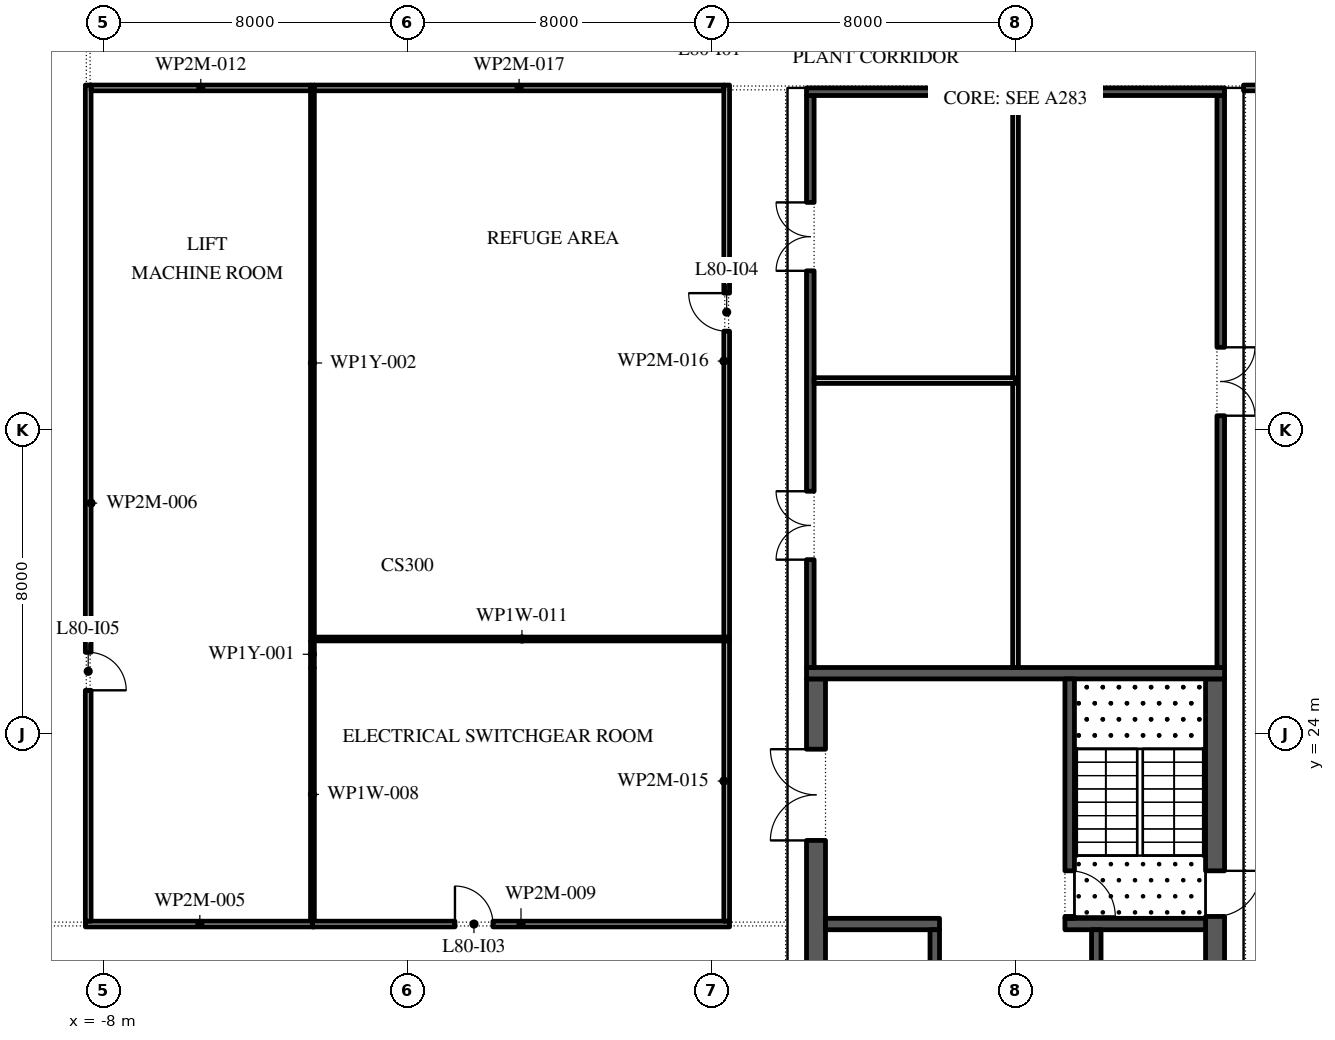
"""IFC4 building model, lengths in metres.
Left out: names, types, materials, properties, quantities, classifications, styles, units other than length and angle.
Written with IfcOpenShell. Run it as: python <this file> out.ifc"""

import sys

from ifc_helpers import new_model, si_unit, direction, frame, frame_2d, origin, place, context, subcontext, project, spatial, rectangle, extrude, element, fill, save


model = new_model("IFC4")
c1 = context("Model", 3, precision=1e-05, world=origin(), true_north=direction((0.0, 1.0)))
c2 = subcontext(c1, "Body", "Model", "MODEL_VIEW")
j1 = project(units=[si_unit("LENGTHUNIT", "METRE"), si_unit("PLANEANGLEUNIT", "RADIAN")], contexts=[c1])
p1 = place(None, origin())
s1 = spatial("IfcSite", under=j1, at=p1, CompositionType="ELEMENT")
p2 = place(p1, origin())
s2 = spatial("IfcBuilding", under=s1, at=p2, CompositionType="ELEMENT")
p3 = place(p2, frame((0.0, 0.0, 363.6)))
s3 = spatial("IfcBuildingStorey", under=s2, at=p3, CompositionType="ELEMENT", Elevation=363.6)
p4 = place(p3, frame((21.25, -2.45, 0.0), z_axis=(0.0, 0.0, 1.0), x_axis=(0.0, 1.0, 0.0)))
e1 = element("IfcWall", 1, at=p4, inside=s3, PredefinedType="SHEAR", context=c2, shape_type="SweptSolid", body=[
    extrude(rectangle(XDim=27.9, YDim=0.5, at=frame_2d((13.95, 0.0))), origin(), (0.0, 0.0, 1.0), 5.2),
])
p5 = place(p4, frame((5.05, 0.0, 0.0)))
e2 = element("IfcOpeningElement", 2, at=p5, cuts=e1, PredefinedType="OPENING", context=c2, shape_type="SweptSolid", body=[
    extrude(rectangle(XDim=1.2, YDim=2.1, at=frame_2d((0.6, 1.05))), frame((0.0, 0.26, 0.0), z_axis=(0.0, -1.0, 0.0), x_axis=(1.0, 0.0, 0.0)), (0.0, 0.0, 1.0), 0.52),
])
p6 = place(p4, frame((21.65, 0.0, 0.0)))
e3 = element("IfcOpeningElement", 3, at=p6, cuts=e1, PredefinedType="OPENING", context=c2, shape_type="SweptSolid", body=[
    extrude(rectangle(XDim=1.2, YDim=2.1, at=frame_2d((0.6, 1.05))), frame((0.0, 0.26, 0.0), z_axis=(0.0, -1.0, 0.0), x_axis=(1.0, 0.0, 0.0)), (0.0, 0.0, 1.0), 0.52),
])
p7 = place(p3, frame((10.75, -2.45, 0.0), z_axis=(0.0, 0.0, 1.0), x_axis=(0.0, 1.0, 0.0)))
e4 = element("IfcWall", 4, at=p7, inside=s3, PredefinedType="SHEAR", context=c2, shape_type="SweptSolid", body=[
    extrude(rectangle(XDim=27.9, YDim=0.5, at=frame_2d((13.95, 0.0))), origin(), (0.0, 0.0, 1.0), 5.2),
])
p8 = place(p7, frame((23.65, 0.0, 0.0)))
e5 = element("IfcOpeningElement", 5, at=p8, cuts=e4, PredefinedType="OPENING", context=c2, shape_type="SweptSolid", body=[
    extrude(rectangle(XDim=2.4, YDim=2.1, at=frame_2d((1.2, 1.05))), frame((0.0, 0.26, 0.0), z_axis=(0.0, -1.0, 0.0), x_axis=(1.0, 0.0, 0.0)), (0.0, 0.0, 1.0), 0.52),
])
p9 = place(p7, frame((2.25, 0.0, 0.0)))
e6 = element("IfcOpeningElement", 6, at=p9, cuts=e4, PredefinedType="OPENING", context=c2, shape_type="SweptSolid", body=[
    extrude(rectangle(XDim=1.8, YDim=2.4, at=frame_2d((0.9, 1.2))), frame((0.0, 0.26, 0.0), z_axis=(0.0, -1.0, 0.0), x_axis=(1.0, 0.0, 0.0)), (0.0, 0.0, 1.0), 0.52),
])
p10 = place(p3, frame((10.5, 25.6, 0.0), z_axis=(0.0, 0.0, 1.0), x_axis=(1.0, 0.0, 0.0)))
e7 = element("IfcWall", 7, at=p10, inside=s3, PredefinedType="SHEAR", context=c2, shape_type="SweptSolid", body=[
    extrude(rectangle(XDim=11.0, YDim=0.3, at=frame_2d((5.5, 0.0))), origin(), (0.0, 0.0, 1.0), 5.2),
])
p11 = place(p3, frame((17.3, 19.0, 0.0), z_axis=(0.0, 0.0, 1.0), x_axis=(1.0, 0.0, 0.0)))
e8 = element("IfcWall", 8, at=p11, inside=s3, PredefinedType="SHEAR", context=c2, shape_type="SweptSolid", body=[
    extrude(rectangle(XDim=3.7, YDim=0.3, at=frame_2d((1.85, 0.0))), origin(), (0.0, 0.0, 1.0), 5.2),
])
p12 = place(p3, frame((17.425, 19.15, 0.0), z_axis=(0.0, 0.0, 1.0), x_axis=(0.0, 1.0, 0.0)))
e9 = element("IfcWall", 9, at=p12, inside=s3, PredefinedType="SHEAR", context=c2, shape_type="SweptSolid", body=[
    extrude(rectangle(XDim=6.3, YDim=0.25, at=frame_2d((3.15, 0.0))), origin(), (0.0, 0.0, 1.0), 5.2),
])
p13 = place(p12, frame((0.05, 0.0, 0.0)))
e10 = element("IfcOpeningElement", 10, at=p13, cuts=e9, PredefinedType="OPENING", context=c2, shape_type="SweptSolid", body=[
    extrude(rectangle(XDim=1.2, YDim=2.1, at=frame_2d((0.6, 1.05))), frame((0.0, 0.135, 0.0), z_axis=(0.0, -1.0, 0.0), x_axis=(1.0, 0.0, 0.0)), (0.0, 0.0, 1.0), 0.27),
])
p14 = place(p3, frame((18.125, 4.15, 0.0), z_axis=(0.0, 0.0, 1.0), x_axis=(0.0, 1.0, 0.0)))
e11 = element("IfcWall", 11, at=p14, inside=s3, PredefinedType="SHEAR", context=c2, shape_type="SweptSolid", body=[
    extrude(rectangle(XDim=14.7, YDim=0.25, at=frame_2d((7.35, 0.0))), origin(), (0.0, 0.0, 1.0), 5.2),
])
p15 = place(p14, frame((7.521, 0.0, 0.0)))
e12 = element("IfcOpeningElement", 12, at=p15, cuts=e11, PredefinedType="OPENING", context=c2, shape_type="SweptSolid", body=[
    extrude(rectangle(XDim=1.8, YDim=2.4, at=frame_2d((0.9, 1.2))), frame((0.0, 0.135, 0.0), z_axis=(0.0, -1.0, 0.0), x_axis=(1.0, 0.0, 0.0)), (0.0, 0.0, 1.0), 0.27),
])
p16 = place(p14, frame((0.371, 0.0, 0.0)))
e13 = element("IfcOpeningElement", 13, at=p16, cuts=e11, PredefinedType="OPENING", context=c2, shape_type="SweptSolid", body=[
    extrude(rectangle(XDim=1.1, YDim=2.1, at=frame_2d((0.55, 1.05))), frame((0.0, 0.135, 0.0), z_axis=(0.0, -1.0, 0.0), x_axis=(1.0, 0.0, 0.0)), (0.0, 0.0, 1.0), 0.27),
])
p17 = place(p3, frame((11.0, 19.0, 0.0), z_axis=(0.0, 0.0, 1.0), x_axis=(1.0, 0.0, 0.0)))
e14 = element("IfcWall", 14, at=p17, inside=s3, PredefinedType="SHEAR", context=c2, shape_type="SweptSolid", body=[
    extrude(rectangle(XDim=3.0, YDim=0.3, at=frame_2d((1.5, 0.0))), origin(), (0.0, 0.0, 1.0), 5.2),
])
p18 = place(p3, frame((13.875, -2.45, 0.0), z_axis=(0.0, 0.0, 1.0), x_axis=(0.0, 1.0, 0.0)))
e15 = element("IfcWall", 15, at=p18, inside=s3, PredefinedType="SHEAR", context=c2, shape_type="SweptSolid", body=[
    extrude(rectangle(XDim=21.3, YDim=0.25, at=frame_2d((10.65, 0.0))), origin(), (0.0, 0.0, 1.0), 5.2),
])
p19 = place(p18, frame((10.907, 0.0, 0.0)))
e16 = element("IfcOpeningElement", 16, at=p19, cuts=e15, PredefinedType="OPENING", context=c2, shape_type="SweptSolid", body=[
    extrude(rectangle(XDim=1.8, YDim=2.4, at=frame_2d((0.9, 1.2))), frame((0.0, 0.135, 0.0), z_axis=(0.0, -1.0, 0.0), x_axis=(1.0, 0.0, 0.0)), (0.0, 0.0, 1.0), 0.27),
])
p20 = place(p18, frame((6.971, 0.0, 0.0)))
e17 = element("IfcOpeningElement", 17, at=p20, cuts=e15, PredefinedType="OPENING", context=c2, shape_type="SweptSolid", body=[
    extrude(rectangle(XDim=1.1, YDim=2.1, at=frame_2d((0.55, 1.05))), frame((0.0, 0.135, 0.0), z_axis=(0.0, -1.0, 0.0), x_axis=(1.0, 0.0, 0.0)), (0.0, 0.0, 1.0), 0.27),
])
p21 = place(p3, frame((21.4, 25.75, 0.0), z_axis=(0.0, 0.0, 1.0), x_axis=(0.0, 1.0, 0.0)))
e18 = element("IfcWall", 18, at=p21, inside=s3, PredefinedType="SHEAR", context=c2, shape_type="SweptSolid", body=[
    extrude(rectangle(XDim=15.05, YDim=0.2, at=frame_2d((7.525, 0.0))), origin(), (0.0, 0.0, 1.0), 5.2),
])
p22 = place(p21, frame((6.625, 0.0, 0.0)))
e19 = element("IfcOpeningElement", 19, at=p22, cuts=e18, PredefinedType="OPENING", context=c2, shape_type="SweptSolid", body=[
    extrude(rectangle(XDim=1.8, YDim=2.4, at=frame_2d((0.9, 1.2))), frame((0.0, 0.11, 0.0), z_axis=(0.0, -1.0, 0.0), x_axis=(1.0, 0.0, 0.0)), (0.0, 0.0, 1.0), 0.22),
])
p23 = place(p3, frame((10.6, 25.75, 0.0), z_axis=(0.0, 0.0, 1.0), x_axis=(0.0, 1.0, 0.0)))
e20 = element("IfcWall", 20, at=p23, inside=s3, PredefinedType="SHEAR", context=c2, shape_type="SweptSolid", body=[
    extrude(rectangle(XDim=15.05, YDim=0.2, at=frame_2d((7.525, 0.0))), origin(), (0.0, 0.0, 1.0), 5.2),
])
p24 = place(p23, frame((2.837, 0.0, 0.0)))
e21 = element("IfcOpeningElement", 21, at=p24, cuts=e20, PredefinedType="OPENING", context=c2, shape_type="SweptSolid", body=[
    extrude(rectangle(XDim=1.8, YDim=2.4, at=frame_2d((0.9, 1.2))), frame((0.0, 0.11, 0.0), z_axis=(0.0, -1.0, 0.0), x_axis=(1.0, 0.0, 0.0)), (0.0, 0.0, 1.0), 0.22),
])
p25 = place(p23, frame((10.438, 0.0, 0.0)))
e22 = element("IfcOpeningElement", 22, at=p25, cuts=e20, PredefinedType="OPENING", context=c2, shape_type="SweptSolid", body=[
    extrude(rectangle(XDim=1.8, YDim=2.4, at=frame_2d((0.9, 1.2))), frame((0.0, 0.11, 0.0), z_axis=(0.0, -1.0, 0.0), x_axis=(1.0, 0.0, 0.0)), (0.0, 0.0, 1.0), 0.22),
])
p26 = place(p3, frame((10.5, 40.9, 0.0), z_axis=(0.0, 0.0, 1.0), x_axis=(1.0, 0.0, 0.0)))
e23 = element("IfcWall", 23, at=p26, inside=s3, PredefinedType="SHEAR", context=c2, shape_type="SweptSolid", body=[
    extrude(rectangle(XDim=11.0, YDim=0.2, at=frame_2d((5.5, 0.0))), origin(), (0.0, 0.0, 1.0), 5.2),
])
p27 = place(p3, frame((16.0, 25.75, 0.0), z_axis=(0.0, 0.0, 1.0), x_axis=(0.0, 1.0, 0.0)))
e24 = element("IfcWall", 24, at=p27, inside=s3, PredefinedType="PARTITIONING", context=c2, shape_type="SweptSolid", body=[
    extrude(rectangle(XDim=15.05, YDim=0.15, at=frame_2d((7.525, 0.0))), origin(), (0.0, 0.0, 1.0), 5.2),
])
p28 = place(p3, frame((10.7, 33.3, 0.0), z_axis=(0.0, 0.0, 1.0), x_axis=(1.0, 0.0, 0.0)))
e25 = element("IfcWall", 25, at=p28, inside=s3, PredefinedType="PARTITIONING", context=c2, shape_type="SweptSolid", body=[
    extrude(rectangle(XDim=5.3, YDim=0.15, at=frame_2d((2.65, 0.0))), origin(), (0.0, 0.0, 1.0), 5.2),
])
p29 = place(p3, frame((-8.475, 19.0, 0.0), z_axis=(0.0, 0.0, 1.0), x_axis=(1.0, 0.0, 0.0)))
e26 = element("IfcWall", 26, at=p29, inside=s3, PredefinedType="PARTITIONING", context=c2, shape_type="SweptSolid", body=[
    extrude(rectangle(XDim=6.025, YDim=0.15, at=frame_2d((3.013, 0.0))), origin(), (0.0, 0.0, 1.0), 5.2),
])
p30 = place(p3, frame((-8.4, 41.075, 0.0), z_axis=(0.0, 0.0, 1.0), x_axis=(0.0, -1.0, 0.0)))
e27 = element("IfcWall", 27, at=p30, inside=s3, PredefinedType="PARTITIONING", context=c2, shape_type="SweptSolid", body=[
    extrude(rectangle(XDim=22.0, YDim=0.15, at=frame_2d((11.0, 0.0))), origin(), (0.0, 0.0, 1.0), 5.2),
])
p31 = place(p30, frame((14.925, 0.0, 0.0)))
e28 = element("IfcOpeningElement", 28, at=p31, cuts=e27, PredefinedType="OPENING", context=c2, shape_type="SweptSolid", body=[
    extrude(rectangle(XDim=1.0, YDim=2.1, at=frame_2d((0.5, 1.05))), frame((0.0, 0.085, 0.0), z_axis=(0.0, -1.0, 0.0), x_axis=(1.0, 0.0, 0.0)), (0.0, 0.0, 1.0), 0.17),
])
p32 = place(p3, frame((-2.5, 19.075, 0.0), z_axis=(0.0, 0.0, 1.0), x_axis=(0.0, 1.0, 0.0)))
e29 = element("IfcWall", 29, at=p32, inside=s3, PredefinedType="PARTITIONING", context=c2, shape_type="SweptSolid", body=[
    extrude(rectangle(XDim=6.67, YDim=0.1, at=frame_2d((3.335, 0.0))), origin(), (0.0, 0.0, 1.0), 5.2),
])
p33 = place(p3, frame((-2.5, 19.0, 0.0), z_axis=(0.0, 0.0, 1.0), x_axis=(1.0, 0.0, 0.0)))
e30 = element("IfcWall", 30, at=p33, inside=s3, PredefinedType="PARTITIONING", context=c2, shape_type="SweptSolid", body=[
    extrude(rectangle(XDim=10.975, YDim=0.15, at=frame_2d((5.488, 0.0))), origin(), (0.0, 0.0, 1.0), 5.2),
])
p34 = place(p33, frame((3.75, 0.0, 0.0)))
e31 = element("IfcOpeningElement", 31, at=p34, cuts=e30, PredefinedType="OPENING", context=c2, shape_type="SweptSolid", body=[
    extrude(rectangle(XDim=1.0, YDim=2.1, at=frame_2d((0.5, 1.05))), frame((0.0, 0.085, 0.0), z_axis=(0.0, -1.0, 0.0), x_axis=(1.0, 0.0, 0.0)), (0.0, 0.0, 1.0), 0.17),
])
p35 = place(p3, frame((-2.5, 26.45, 0.0), z_axis=(0.0, 0.0, 1.0), x_axis=(0.0, 1.0, 0.0)))
e32 = element("IfcWall", 32, at=p35, inside=s3, PredefinedType="PARTITIONING", context=c2, shape_type="SweptSolid", body=[
    extrude(rectangle(XDim=14.625, YDim=0.1, at=frame_2d((7.312, 0.0))), origin(), (0.0, 0.0, 1.0), 4.22),
])
p36 = place(p3, frame((-2.45, 26.5, 0.0), z_axis=(0.0, 0.0, 1.0), x_axis=(1.0, 0.0, 0.0)))
e33 = element("IfcWall", 33, at=p36, inside=s3, PredefinedType="PARTITIONING", context=c2, shape_type="SweptSolid", body=[
    extrude(rectangle(XDim=10.925, YDim=0.1, at=frame_2d((5.462, 0.0))), origin(), (0.0, 0.0, 1.0), 5.2),
])
p37 = place(p3, frame((-2.55, 41.0, 0.0), z_axis=(0.0, 0.0, 1.0), x_axis=(-1.0, 0.0, 0.0)))
e34 = element("IfcWall", 34, at=p37, inside=s3, PredefinedType="PARTITIONING", context=c2, shape_type="SweptSolid", body=[
    extrude(rectangle(XDim=5.775, YDim=0.15, at=frame_2d((2.887, 0.0))), origin(), (0.0, 0.0, 1.0), 5.2),
])
p38 = place(p3, frame((8.4, 19.075, 0.0), z_axis=(0.0, 0.0, 1.0), x_axis=(0.0, 1.0, 0.0)))
e35 = element("IfcWall", 35, at=p38, inside=s3, PredefinedType="PARTITIONING", context=c2, shape_type="SweptSolid", body=[
    extrude(rectangle(XDim=7.375, YDim=0.15, at=frame_2d((3.688, 0.0))), origin(), (0.0, 0.0, 1.0), 5.2),
])
p39 = place(p3, frame((8.4, 26.55, 0.0), z_axis=(0.0, 0.0, 1.0), x_axis=(0.0, 1.0, 0.0)))
e36 = element("IfcWall", 36, at=p39, inside=s3, PredefinedType="PARTITIONING", context=c2, shape_type="SweptSolid", body=[
    extrude(rectangle(XDim=14.525, YDim=0.15, at=frame_2d((7.262, 0.0))), origin(), (0.0, 0.0, 1.0), 5.2),
])
p40 = place(p39, frame((8.05, 0.0, 0.0)))
e37 = element("IfcOpeningElement", 37, at=p40, cuts=e36, PredefinedType="OPENING", context=c2, shape_type="SweptSolid", body=[
    extrude(rectangle(XDim=1.0, YDim=2.1, at=frame_2d((0.5, 1.05))), frame((0.0, 0.085, 0.0), z_axis=(0.0, -1.0, 0.0), x_axis=(1.0, 0.0, 0.0)), (0.0, 0.0, 1.0), 0.17),
])
p41 = place(p3, frame((8.325, 41.0, 0.0), z_axis=(0.0, 0.0, 1.0), x_axis=(-1.0, 0.0, 0.0)))
e38 = element("IfcWall", 38, at=p41, inside=s3, PredefinedType="PARTITIONING", context=c2, shape_type="SweptSolid", body=[
    extrude(rectangle(XDim=10.775, YDim=0.15, at=frame_2d((5.387, 0.0))), origin(), (0.0, 0.0, 1.0), 5.2),
])
p42 = place(p3, frame((26.05, 41.0, 0.0), z_axis=(0.0, 0.0, 1.0), x_axis=(-1.0, 0.0, 0.0)))
e39 = element("IfcWall", 39, at=p42, inside=s3, PredefinedType="PARTITIONING", context=c2, shape_type="SweptSolid", body=[
    extrude(rectangle(XDim=4.05, YDim=0.15, at=frame_2d((2.025, 0.0))), origin(), (0.0, 0.0, 1.0), 5.2),
])
p43 = place(p42, frame((0.9, 0.0, 0.0)))
e40 = element("IfcOpeningElement", 40, at=p43, cuts=e39, PredefinedType="OPENING", context=c2, shape_type="SweptSolid", body=[
    extrude(rectangle(XDim=1.0, YDim=2.1, at=frame_2d((0.5, 1.05))), frame((0.0, 0.085, 0.0), z_axis=(0.0, -1.0, 0.0), x_axis=(1.0, 0.0, 0.0)), (0.0, 0.0, 1.0), 0.17),
])
p44 = place(p3, frame((-2.5, 25.745, 0.0), z_axis=(0.0, 0.0, 1.0), x_axis=(0.0, 1.0, 0.0)))
e41 = element("IfcWall", 41, at=p44, inside=s3, PredefinedType="PARTITIONING", context=c2, shape_type="SweptSolid", body=[
    extrude(rectangle(XDim=0.705, YDim=0.1, at=frame_2d((0.353, 0.0))), origin(), (0.0, 0.0, 1.0), 4.22),
])
p45 = place(p8, origin())
e42 = element("IfcDoor", 42, at=p45, inside=s3, OperationType="DOUBLE_DOOR_SINGLE_SWING", PredefinedType="DOOR", context=c2, shape_type="SweptSolid", body=[
    extrude(rectangle(XDim=2.4, YDim=2.1, at=frame_2d((1.2, 1.05))), frame((0.0, 0.025, 0.0), z_axis=(0.0, -1.0, 0.0), x_axis=(1.0, 0.0, 0.0)), (0.0, 0.0, 1.0), 0.05),
])
fill(e5, e42)
p46 = place(p13, frame((1.2, 0.0, 0.0), z_axis=(0.0, 0.0, 1.0), x_axis=(-1.0, 0.0, 0.0)))
e43 = element("IfcDoor", 43, at=p46, inside=s3, OperationType="SINGLE_SWING_LEFT", PredefinedType="DOOR", context=c2, shape_type="SweptSolid", body=[
    extrude(rectangle(XDim=1.2, YDim=2.1, at=frame_2d((0.6, 1.05))), frame((0.0, 0.025, 0.0), z_axis=(0.0, -1.0, 0.0), x_axis=(1.0, 0.0, 0.0)), (0.0, 0.0, 1.0), 0.05),
])
fill(e10, e43)
p47 = place(p6, frame((1.2, 0.0, 0.0), z_axis=(0.0, 0.0, 1.0), x_axis=(-1.0, 0.0, 0.0)))
e44 = element("IfcDoor", 44, at=p47, inside=s3, OperationType="SINGLE_SWING_RIGHT", PredefinedType="DOOR", context=c2, shape_type="SweptSolid", body=[
    extrude(rectangle(XDim=1.2, YDim=2.1, at=frame_2d((0.6, 1.05))), frame((0.0, 0.025, 0.0), z_axis=(0.0, -1.0, 0.0), x_axis=(1.0, 0.0, 0.0)), (0.0, 0.0, 1.0), 0.05),
])
fill(e3, e44)
p48 = place(p22, frame((1.8, 0.15, 0.0), z_axis=(0.0, 0.0, 1.0), x_axis=(-1.0, 0.0, 0.0)))
e45 = element("IfcDoor", 45, at=p48, inside=s3, OperationType="DOUBLE_DOOR_SINGLE_SWING", PredefinedType="DOOR", context=c2, shape_type="SweptSolid", body=[
    extrude(rectangle(XDim=1.8, YDim=2.4, at=frame_2d((0.9, 1.2))), frame((0.0, 0.1, 0.0), z_axis=(0.0, -1.0, 0.0), x_axis=(1.0, 0.0, 0.0)), (0.0, 0.0, 1.0), 0.05),
])
fill(e19, e45)
p49 = place(p24, origin())
e46 = element("IfcDoor", 46, at=p49, inside=s3, OperationType="DOUBLE_DOOR_SINGLE_SWING", PredefinedType="DOOR", context=c2, shape_type="SweptSolid", body=[
    extrude(rectangle(XDim=1.8, YDim=2.4, at=frame_2d((0.9, 1.2))), frame((0.0, -0.05, 0.0), z_axis=(0.0, -1.0, 0.0), x_axis=(1.0, 0.0, 0.0)), (0.0, 0.0, 1.0), 0.05),
])
fill(e21, e46)
p50 = place(p25, origin())
e47 = element("IfcDoor", 47, at=p50, inside=s3, OperationType="DOUBLE_DOOR_SINGLE_SWING", PredefinedType="DOOR", context=c2, shape_type="SweptSolid", body=[
    extrude(rectangle(XDim=1.8, YDim=2.4, at=frame_2d((0.9, 1.2))), frame((0.0, -0.05, 0.0), z_axis=(0.0, -1.0, 0.0), x_axis=(1.0, 0.0, 0.0)), (0.0, 0.0, 1.0), 0.05),
])
fill(e22, e47)
p51 = place(p34, origin())
e48 = element("IfcDoor", 48, at=p51, inside=s3, OperationType="SINGLE_SWING_RIGHT", PredefinedType="DOOR", context=c2, shape_type="SweptSolid", body=[
    extrude(rectangle(XDim=1.0, YDim=2.1, at=frame_2d((0.5, 1.05))), frame((0.0, 0.025, 0.0), z_axis=(0.0, -1.0, 0.0), x_axis=(1.0, 0.0, 0.0)), (0.0, 0.0, 1.0), 0.05),
])
fill(e31, e48)
p52 = place(p40, origin())
e49 = element("IfcDoor", 49, at=p52, inside=s3, OperationType="SINGLE_SWING_LEFT", PredefinedType="DOOR", context=c2, shape_type="SweptSolid", body=[
    extrude(rectangle(XDim=1.0, YDim=2.1, at=frame_2d((0.5, 1.05))), frame((0.0, 0.025, 0.0), z_axis=(0.0, -1.0, 0.0), x_axis=(1.0, 0.0, 0.0)), (0.0, 0.0, 1.0), 0.05),
])
fill(e37, e49)
p53 = place(p31, origin())
e50 = element("IfcDoor", 50, at=p53, inside=s3, OperationType="SINGLE_SWING_LEFT", PredefinedType="DOOR", context=c2, shape_type="SweptSolid", body=[
    extrude(rectangle(XDim=1.0, YDim=2.1, at=frame_2d((0.5, 1.05))), frame((0.0, 0.025, 0.0), z_axis=(0.0, -1.0, 0.0), x_axis=(1.0, 0.0, 0.0)), (0.0, 0.0, 1.0), 0.05),
])
fill(e28, e50)
save(model, sys.argv[1])
